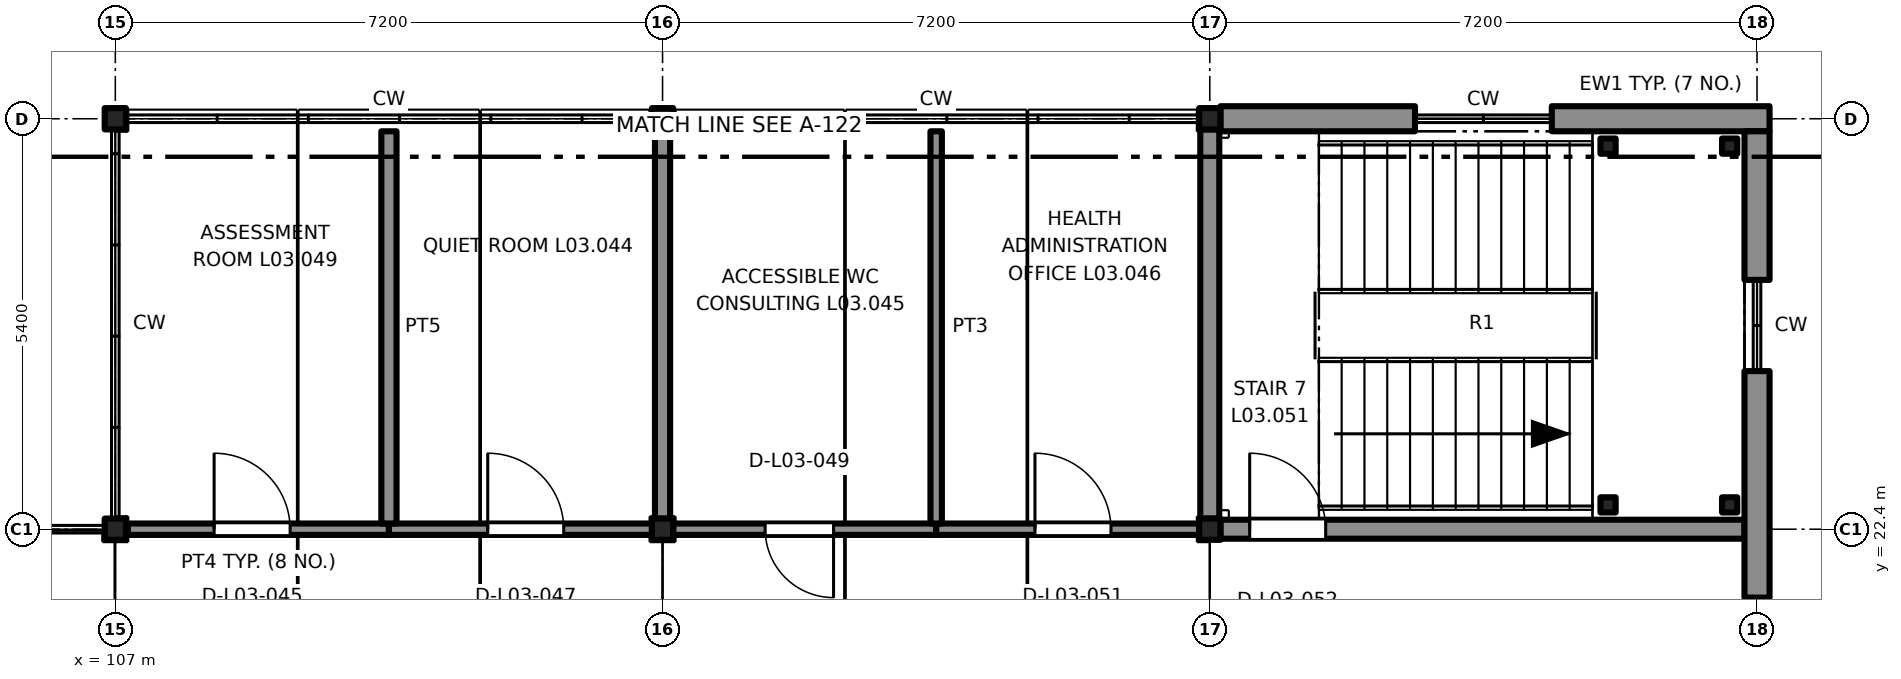
"""IFC4 building model, lengths in metres.
Left out: names, types, materials, properties, quantities, classifications, styles, units other than length and angle.
Written with IfcOpenShell. Run it as: python <this file> out.ifc"""

import sys

from ifc_helpers import new_model, si_unit, direction, frame, frame_2d, origin, origin_2d, place, context, subcontext, project, spatial, rectangle, extrude, element, fill, save


model = new_model("IFC4")
c1 = context("Model", 3, precision=1e-05, world=origin(), true_north=direction((0.0, 1.0)))
c2 = subcontext(c1, "Body", "Model", "MODEL_VIEW")
j1 = project(units=[si_unit("LENGTHUNIT", "METRE"), si_unit("PLANEANGLEUNIT", "RADIAN")], contexts=[c1])
p1 = place(None, origin())
s1 = spatial("IfcSite", under=j1, at=p1, CompositionType="ELEMENT")
p2 = place(p1, origin())
s2 = spatial("IfcBuilding", under=s1, at=p2, CompositionType="ELEMENT")
p3 = place(p2, frame((0.0, 0.0, 14.1)))
s3 = spatial("IfcBuildingStorey", under=s2, at=p3, CompositionType="ELEMENT", Elevation=14.1)
for number, where, z_axis, x_axis in (
    (1, (107.0, 22.4, 0.0), (0.0, 0.0, 1.0), (1.0, 0.0, 0.0)),
    (2, (107.0, 27.8, 0.0), (0.0, 0.0, 1.0), (1.0, 0.0, 0.0)),
    (3, (114.2, 22.4, 0.0), (0.0, 0.0, 1.0), (1.0, 0.0, 0.0)),
    (4, (114.2, 27.8, 0.0), (0.0, 0.0, 1.0), (1.0, 0.0, 0.0)),
    (5, (121.4, 22.4, 0.0), (0.0, 0.0, 1.0), (1.0, 0.0, 0.0)),
    (6, (121.4, 27.8, 0.0), (0.0, 0.0, 1.0), (1.0, 0.0, 0.0)),
):
    element("IfcColumn", number, at=place(p3, frame(where, z_axis=z_axis, x_axis=x_axis)), inside=s3, PredefinedType="COLUMN", context=c2, shape_type="SweptSolid", body=[
        extrude(rectangle(XDim=0.28, YDim=0.28, at=origin_2d()), origin(), (0.0, 0.0, 1.0), 3.9),
    ])
p4 = place(p3, frame((121.54, 22.4, 0.0), z_axis=(0.0, 0.0, 1.0), x_axis=(1.0, 0.0, 0.0)))
e7 = element("IfcWall", 7, at=p4, inside=s3, PredefinedType="SHEAR", context=c2, shape_type="SweptSolid", body=[
    extrude(rectangle(XDim=6.895, YDim=0.25, at=frame_2d((3.448, 0.0))), origin(), (0.0, 0.0, 1.0), 3.2),
])
p5 = place(p4, frame((0.385, 0.0, 0.0)))
e8 = element("IfcOpeningElement", 8, at=p5, cuts=e7, PredefinedType="OPENING", context=c2, shape_type="SweptSolid", body=[
    extrude(rectangle(XDim=1.0, YDim=2.1, at=frame_2d((0.5, 1.05))), frame((0.0, 0.135, 0.0), z_axis=(0.0, -1.0, 0.0), x_axis=(1.0, 0.0, 0.0)), (0.0, 0.0, 1.0), 0.27),
])
p6 = place(p3, frame((121.4, 22.54, 0.0), z_axis=(0.0, 0.0, 1.0), x_axis=(0.0, 1.0, 0.0)))
e9 = element("IfcWall", 9, at=p6, inside=s3, PredefinedType="SHEAR", context=c2, shape_type="SweptSolid", body=[
    extrude(rectangle(XDim=5.12, YDim=0.25, at=frame_2d((2.56, 0.0))), origin(), (0.0, 0.0, 1.0), 3.2),
])
for number, where, z_axis, x_axis in (
    (10, (128.24, 22.72, 0.0), (0.0, 0.0, 1.0), (1.0, 0.0, 0.0)),
    (11, (128.24, 27.44, 0.0), (0.0, 0.0, 1.0), (1.0, 0.0, 0.0)),
    (12, (126.64, 22.72, 0.0), (0.0, 0.0, 1.0), (1.0, 0.0, 0.0)),
    (13, (126.64, 27.44, 0.0), (0.0, 0.0, 1.0), (1.0, 0.0, 0.0)),
):
    element("IfcColumn", number, at=place(p3, frame(where, z_axis=z_axis, x_axis=x_axis)), inside=s3, PredefinedType="COLUMN", context=c2, shape_type="SweptSolid", body=[
        extrude(rectangle(XDim=0.2, YDim=0.2, at=origin_2d()), origin(), (0.0, 0.0, 1.0), 1.75),
    ])
p7 = place(p3, frame((121.54, 27.8, 0.0), z_axis=(0.0, 0.0, 1.0), x_axis=(1.0, 0.0, 0.0)))
e14 = element("IfcWall", 14, at=p7, inside=s3, PredefinedType="SOLIDWALL", context=c2, shape_type="SweptSolid", body=[
    extrude(rectangle(XDim=2.56, YDim=0.33, at=frame_2d((1.28, 0.0))), origin(), (0.0, 0.0, 1.0), 3.2),
])
p8 = place(p3, frame((125.9, 27.8, 0.0), z_axis=(0.0, 0.0, 1.0), x_axis=(1.0, 0.0, 0.0)))
e15 = element("IfcWall", 15, at=p8, inside=s3, PredefinedType="SOLIDWALL", context=c2, shape_type="SweptSolid", body=[
    extrude(rectangle(XDim=2.865, YDim=0.33, at=frame_2d((1.433, 0.0))), origin(), (0.0, 0.0, 1.0), 3.2),
])
p9 = place(p3, frame((128.6, 24.48, 0.0), z_axis=(0.0, 0.0, 1.0), x_axis=(0.0, -1.0, 0.0)))
e16 = element("IfcWall", 16, at=p9, inside=s3, PredefinedType="SOLIDWALL", context=c2, shape_type="SweptSolid", body=[
    extrude(rectangle(XDim=2.98, YDim=0.33, at=frame_2d((1.49, 0.0))), origin(), (0.0, 0.0, 1.0), 3.2),
])
p10 = place(p3, frame((128.6, 27.635, 0.0), z_axis=(0.0, 0.0, 1.0), x_axis=(0.0, -1.0, 0.0)))
e17 = element("IfcWall", 17, at=p10, inside=s3, PredefinedType="SOLIDWALL", context=c2, shape_type="SweptSolid", body=[
    extrude(rectangle(XDim=1.955, YDim=0.33, at=frame_2d((0.978, 0.0))), origin(), (0.0, 0.0, 1.0), 3.2),
])
p11 = place(p3, frame((107.165, 22.4, 0.0), z_axis=(0.0, 0.0, 1.0), x_axis=(1.0, 0.0, 0.0)))
e18 = element("IfcWall", 18, at=p11, inside=s3, PredefinedType="PARTITIONING", context=c2, shape_type="SweptSolid", body=[
    extrude(rectangle(XDim=3.435, YDim=0.15, at=frame_2d((1.718, 0.0))), origin(), (0.0, 0.0, 1.0), 5.331),
])
p12 = place(p11, frame((1.135, 0.0, 0.0)))
e19 = element("IfcOpeningElement", 19, at=p12, cuts=e18, PredefinedType="OPENING", context=c2, shape_type="SweptSolid", body=[
    extrude(rectangle(XDim=1.0, YDim=2.1, at=frame_2d((0.5, 1.05))), frame((0.0, 0.085, 0.0), z_axis=(0.0, -1.0, 0.0), x_axis=(1.0, 0.0, 0.0)), (0.0, 0.0, 1.0), 0.17),
])
p13 = place(p3, frame((110.6, 22.4, 0.0), z_axis=(0.0, 0.0, 1.0), x_axis=(1.0, 0.0, 0.0)))
e20 = element("IfcWall", 20, at=p13, inside=s3, PredefinedType="PARTITIONING", context=c2, shape_type="SweptSolid", body=[
    extrude(rectangle(XDim=3.46, YDim=0.15, at=frame_2d((1.73, 0.0))), origin(), (0.0, 0.0, 1.0), 5.331),
])
p14 = place(p13, frame((1.3, 0.0, 0.0)))
e21 = element("IfcOpeningElement", 21, at=p14, cuts=e20, PredefinedType="OPENING", context=c2, shape_type="SweptSolid", body=[
    extrude(rectangle(XDim=1.0, YDim=2.1, at=frame_2d((0.5, 1.05))), frame((0.0, 0.085, 0.0), z_axis=(0.0, -1.0, 0.0), x_axis=(1.0, 0.0, 0.0)), (0.0, 0.0, 1.0), 0.17),
])
p15 = place(p3, frame((110.6, 27.635, 0.0), z_axis=(0.0, 0.0, 1.0), x_axis=(0.0, -1.0, 0.0)))
e22 = element("IfcWall", 22, at=p15, inside=s3, PredefinedType="PARTITIONING", context=c2, shape_type="SweptSolid", body=[
    extrude(rectangle(XDim=5.16, YDim=0.2, at=frame_2d((2.58, 0.0))), origin(), (0.0, 0.0, 1.0), 5.331),
])
p16 = place(p3, frame((117.8, 22.4, 0.0), z_axis=(0.0, 0.0, 1.0), x_axis=(-1.0, 0.0, 0.0)))
e23 = element("IfcWall", 23, at=p16, inside=s3, PredefinedType="PARTITIONING", context=c2, shape_type="SweptSolid", body=[
    extrude(rectangle(XDim=3.46, YDim=0.15, at=frame_2d((1.73, 0.0))), origin(), (0.0, 0.0, 1.0), 5.331),
])
p17 = place(p16, frame((1.35, 0.0, 0.0)))
e24 = element("IfcOpeningElement", 24, at=p17, cuts=e23, PredefinedType="OPENING", context=c2, shape_type="SweptSolid", body=[
    extrude(rectangle(XDim=0.9, YDim=2.1, at=frame_2d((0.45, 1.05))), frame((0.0, 0.085, 0.0), z_axis=(0.0, -1.0, 0.0), x_axis=(1.0, 0.0, 0.0)), (0.0, 0.0, 1.0), 0.17),
])
p18 = place(p3, frame((114.2, 27.635, 0.0), z_axis=(0.0, 0.0, 1.0), x_axis=(0.0, -1.0, 0.0)))
e25 = element("IfcWall", 25, at=p18, inside=s3, PredefinedType="PARTITIONING", context=c2, shape_type="SweptSolid", body=[
    extrude(rectangle(XDim=5.095, YDim=0.2, at=frame_2d((2.547, 0.0))), origin(), (0.0, 0.0, 1.0), 3.9),
])
p19 = place(p3, frame((117.8, 22.4, 0.0), z_axis=(0.0, 0.0, 1.0), x_axis=(1.0, 0.0, 0.0)))
e26 = element("IfcWall", 26, at=p19, inside=s3, PredefinedType="PARTITIONING", context=c2, shape_type="SweptSolid", body=[
    extrude(rectangle(XDim=3.46, YDim=0.15, at=frame_2d((1.73, 0.0))), origin(), (0.0, 0.0, 1.0), 5.331),
])
p20 = place(p19, frame((1.3, 0.0, 0.0)))
e27 = element("IfcOpeningElement", 27, at=p20, cuts=e26, PredefinedType="OPENING", context=c2, shape_type="SweptSolid", body=[
    extrude(rectangle(XDim=1.0, YDim=2.1, at=frame_2d((0.5, 1.05))), frame((0.0, 0.085, 0.0), z_axis=(0.0, -1.0, 0.0), x_axis=(1.0, 0.0, 0.0)), (0.0, 0.0, 1.0), 0.17),
])
p21 = place(p3, frame((117.8, 27.635, 0.0), z_axis=(0.0, 0.0, 1.0), x_axis=(0.0, -1.0, 0.0)))
e28 = element("IfcWall", 28, at=p21, inside=s3, PredefinedType="PARTITIONING", context=c2, shape_type="SweptSolid", body=[
    extrude(rectangle(XDim=5.16, YDim=0.15, at=frame_2d((2.58, 0.0))), origin(), (0.0, 0.0, 1.0), 5.331),
])
p22 = place(p5, origin())
e29 = element("IfcDoor", 29, at=p22, inside=s3, OperationType="SINGLE_SWING_RIGHT", PredefinedType="DOOR", context=c2, shape_type="SweptSolid", body=[
    extrude(rectangle(XDim=1.0, YDim=2.1, at=frame_2d((0.5, 1.05))), frame((0.0, 0.025, 0.0), z_axis=(0.0, -1.0, 0.0), x_axis=(1.0, 0.0, 0.0)), (0.0, 0.0, 1.0), 0.05),
])
fill(e8, e29)
p23 = place(p12, origin())
e30 = element("IfcDoor", 30, at=p23, inside=s3, OperationType="SINGLE_SWING_LEFT", PredefinedType="DOOR", context=c2, shape_type="SweptSolid", body=[
    extrude(rectangle(XDim=1.0, YDim=2.1, at=frame_2d((0.5, 1.05))), frame((0.0, 0.025, 0.0), z_axis=(0.0, -1.0, 0.0), x_axis=(1.0, 0.0, 0.0)), (0.0, 0.0, 1.0), 0.05),
])
fill(e19, e30)
p24 = place(p14, origin())
e31 = element("IfcDoor", 31, at=p24, inside=s3, OperationType="SINGLE_SWING_RIGHT", PredefinedType="DOOR", context=c2, shape_type="SweptSolid", body=[
    extrude(rectangle(XDim=1.0, YDim=2.1, at=frame_2d((0.5, 1.05))), frame((0.0, 0.025, 0.0), z_axis=(0.0, -1.0, 0.0), x_axis=(1.0, 0.0, 0.0)), (0.0, 0.0, 1.0), 0.05),
])
fill(e21, e31)
p25 = place(p17, origin())
e32 = element("IfcDoor", 32, at=p25, inside=s3, OperationType="SINGLE_SWING_RIGHT", PredefinedType="DOOR", context=c2, shape_type="SweptSolid", body=[
    extrude(rectangle(XDim=0.9, YDim=2.1, at=frame_2d((0.45, 1.05))), frame((0.0, 0.025, 0.0), z_axis=(0.0, -1.0, 0.0), x_axis=(1.0, 0.0, 0.0)), (0.0, 0.0, 1.0), 0.05),
])
fill(e24, e32)
p26 = place(p20, origin())
e33 = element("IfcDoor", 33, at=p26, inside=s3, OperationType="SINGLE_SWING_RIGHT", PredefinedType="DOOR", context=c2, shape_type="SweptSolid", body=[
    extrude(rectangle(XDim=1.0, YDim=2.1, at=frame_2d((0.5, 1.05))), frame((0.0, 0.025, 0.0), z_axis=(0.0, -1.0, 0.0), x_axis=(1.0, 0.0, 0.0)), (0.0, 0.0, 1.0), 0.05),
])
fill(e27, e33)
save(model, sys.argv[1])
